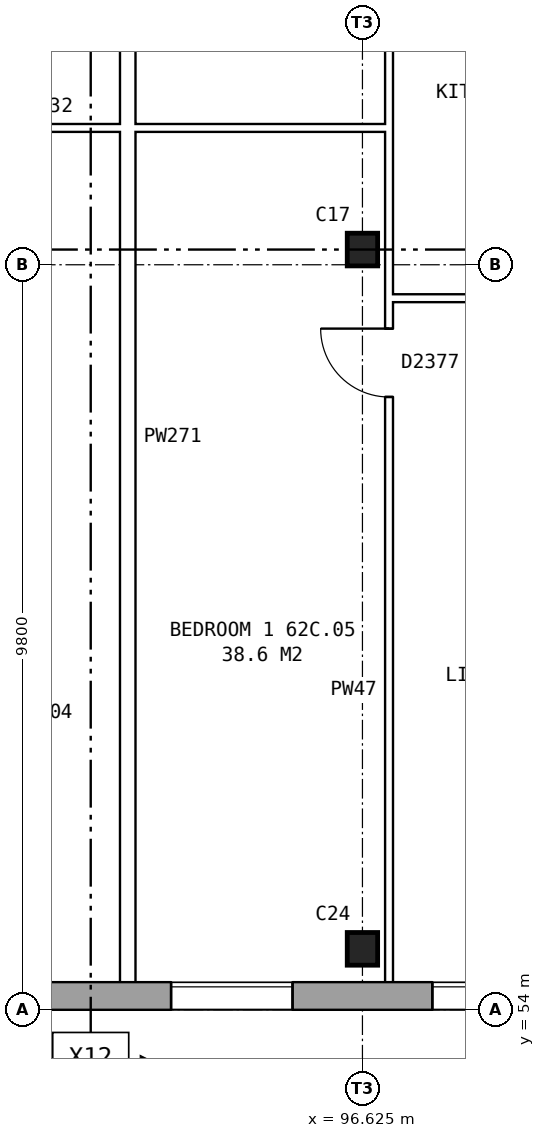
"""IFC4 building model, lengths in metres.
Left out: names, types, materials, properties, quantities, classifications, styles, units other than length and angle.
Written with IfcOpenShell. Run it as: python <this file> out.ifc"""

import sys

from ifc_helpers import new_model, si_unit, direction, frame, frame_2d, origin, origin_2d, place, context, subcontext, project, spatial, rectangle, i_section, extrude, element, fill, save


model = new_model("IFC4")
c1 = context("Model", 3, precision=1e-05, world=origin(), true_north=direction((0.0, 1.0)))
c2 = subcontext(c1, "Body", "Model", "MODEL_VIEW")
j1 = project(units=[si_unit("LENGTHUNIT", "METRE"), si_unit("PLANEANGLEUNIT", "RADIAN")], contexts=[c1])
p1 = place(None, origin())
s1 = spatial("IfcSite", under=j1, at=p1, CompositionType="ELEMENT")
p2 = place(p1, origin())
s2 = spatial("IfcBuilding", under=s1, at=p2, CompositionType="ELEMENT")
p3 = place(p2, frame((0.0, 0.0, 221.4)))
s3 = spatial("IfcBuildingStorey", under=s2, at=p3, CompositionType="ELEMENT", Elevation=221.4)
for number, where, z_axis, x_axis in (
    (1, (96.625, 54.8, 0.0), (0.0, 0.0, 1.0), (1.0, 0.0, 0.0)),
    (2, (96.625, 64.0, 0.0), (0.0, 0.0, 1.0), (1.0, 0.0, 0.0)),
):
    element("IfcColumn", number, at=place(p3, frame(where, z_axis=z_axis, x_axis=x_axis)), inside=s3, PredefinedType="COLUMN", context=c2, shape_type="SweptSolid", body=[
        extrude(i_section(OverallWidth=0.4, OverallDepth=0.43, WebThickness=0.04, FlangeThickness=0.04, at=origin_2d()), origin(), (0.0, 0.0, 1.0), 2.85),
    ])
p4 = place(p3, frame((75.95, 54.18, 0.0), z_axis=(0.0, 0.0, 1.0), x_axis=(1.0, 0.0, 0.0)))
e3 = element("IfcWall", 3, at=p4, inside=s3, PredefinedType="STANDARD", context=c2, shape_type="SweptSolid", body=[
    extrude(rectangle(XDim=55.1, YDim=0.36, at=frame_2d((27.55, 0.0))), origin(), (0.0, 0.0, 1.0), 2.85),
])
p5 = place(p4, frame((0.969, 0.0, 0.8)))
e4 = element("IfcOpeningElement", 4, at=p5, cuts=e3, PredefinedType="OPENING", context=c2, shape_type="SweptSolid", body=[
    extrude(rectangle(XDim=1.6, YDim=1.8, at=frame_2d((0.8, 0.9))), frame((0.0, 0.19, 0.0), z_axis=(0.0, -1.0, 0.0), x_axis=(1.0, 0.0, 0.0)), (0.0, 0.0, 1.0), 0.38),
])
p6 = place(p4, frame((4.406, 0.0, 0.8)))
e5 = element("IfcOpeningElement", 5, at=p6, cuts=e3, PredefinedType="OPENING", context=c2, shape_type="SweptSolid", body=[
    extrude(rectangle(XDim=1.6, YDim=1.8, at=frame_2d((0.8, 0.9))), frame((0.0, 0.19, 0.0), z_axis=(0.0, -1.0, 0.0), x_axis=(1.0, 0.0, 0.0)), (0.0, 0.0, 1.0), 0.38),
])
p7 = place(p4, frame((7.844, 0.0, 0.8)))
e6 = element("IfcOpeningElement", 6, at=p7, cuts=e3, PredefinedType="OPENING", context=c2, shape_type="SweptSolid", body=[
    extrude(rectangle(XDim=1.6, YDim=1.8, at=frame_2d((0.8, 0.9))), frame((0.0, 0.19, 0.0), z_axis=(0.0, -1.0, 0.0), x_axis=(1.0, 0.0, 0.0)), (0.0, 0.0, 1.0), 0.38),
])
p8 = place(p4, frame((11.281, 0.0, 0.8)))
e7 = element("IfcOpeningElement", 7, at=p8, cuts=e3, PredefinedType="OPENING", context=c2, shape_type="SweptSolid", body=[
    extrude(rectangle(XDim=1.6, YDim=1.8, at=frame_2d((0.8, 0.9))), frame((0.0, 0.19, 0.0), z_axis=(0.0, -1.0, 0.0), x_axis=(1.0, 0.0, 0.0)), (0.0, 0.0, 1.0), 0.38),
])
p9 = place(p4, frame((14.719, 0.0, 0.8)))
e8 = element("IfcOpeningElement", 8, at=p9, cuts=e3, PredefinedType="OPENING", context=c2, shape_type="SweptSolid", body=[
    extrude(rectangle(XDim=1.6, YDim=1.8, at=frame_2d((0.8, 0.9))), frame((0.0, 0.19, 0.0), z_axis=(0.0, -1.0, 0.0), x_axis=(1.0, 0.0, 0.0)), (0.0, 0.0, 1.0), 0.38),
])
p10 = place(p4, frame((18.156, 0.0, 0.8)))
e9 = element("IfcOpeningElement", 9, at=p10, cuts=e3, PredefinedType="OPENING", context=c2, shape_type="SweptSolid", body=[
    extrude(rectangle(XDim=1.6, YDim=1.8, at=frame_2d((0.8, 0.9))), frame((0.0, 0.19, 0.0), z_axis=(0.0, -1.0, 0.0), x_axis=(1.0, 0.0, 0.0)), (0.0, 0.0, 1.0), 0.38),
])
p11 = place(p4, frame((21.594, 0.0, 0.8)))
e10 = element("IfcOpeningElement", 10, at=p11, cuts=e3, PredefinedType="OPENING", context=c2, shape_type="SweptSolid", body=[
    extrude(rectangle(XDim=1.6, YDim=1.8, at=frame_2d((0.8, 0.9))), frame((0.0, 0.19, 0.0), z_axis=(0.0, -1.0, 0.0), x_axis=(1.0, 0.0, 0.0)), (0.0, 0.0, 1.0), 0.38),
])
p12 = place(p4, frame((25.031, 0.0, 0.8)))
e11 = element("IfcOpeningElement", 11, at=p12, cuts=e3, PredefinedType="OPENING", context=c2, shape_type="SweptSolid", body=[
    extrude(rectangle(XDim=1.6, YDim=1.8, at=frame_2d((0.8, 0.9))), frame((0.0, 0.19, 0.0), z_axis=(0.0, -1.0, 0.0), x_axis=(1.0, 0.0, 0.0)), (0.0, 0.0, 1.0), 0.38),
])
p13 = place(p4, frame((28.469, 0.0, 0.8)))
e12 = element("IfcOpeningElement", 12, at=p13, cuts=e3, PredefinedType="OPENING", context=c2, shape_type="SweptSolid", body=[
    extrude(rectangle(XDim=1.6, YDim=1.8, at=frame_2d((0.8, 0.9))), frame((0.0, 0.19, 0.0), z_axis=(0.0, -1.0, 0.0), x_axis=(1.0, 0.0, 0.0)), (0.0, 0.0, 1.0), 0.38),
])
p14 = place(p4, frame((31.906, 0.0, 0.8)))
e13 = element("IfcOpeningElement", 13, at=p14, cuts=e3, PredefinedType="OPENING", context=c2, shape_type="SweptSolid", body=[
    extrude(rectangle(XDim=1.6, YDim=1.8, at=frame_2d((0.8, 0.9))), frame((0.0, 0.19, 0.0), z_axis=(0.0, -1.0, 0.0), x_axis=(1.0, 0.0, 0.0)), (0.0, 0.0, 1.0), 0.38),
])
p15 = place(p4, frame((35.344, 0.0, 0.8)))
e14 = element("IfcOpeningElement", 14, at=p15, cuts=e3, PredefinedType="OPENING", context=c2, shape_type="SweptSolid", body=[
    extrude(rectangle(XDim=1.6, YDim=1.8, at=frame_2d((0.8, 0.9))), frame((0.0, 0.19, 0.0), z_axis=(0.0, -1.0, 0.0), x_axis=(1.0, 0.0, 0.0)), (0.0, 0.0, 1.0), 0.38),
])
p16 = place(p4, frame((38.781, 0.0, 0.8)))
e15 = element("IfcOpeningElement", 15, at=p16, cuts=e3, PredefinedType="OPENING", context=c2, shape_type="SweptSolid", body=[
    extrude(rectangle(XDim=1.6, YDim=1.8, at=frame_2d((0.8, 0.9))), frame((0.0, 0.19, 0.0), z_axis=(0.0, -1.0, 0.0), x_axis=(1.0, 0.0, 0.0)), (0.0, 0.0, 1.0), 0.38),
])
p17 = place(p4, frame((42.219, 0.0, 0.8)))
e16 = element("IfcOpeningElement", 16, at=p17, cuts=e3, PredefinedType="OPENING", context=c2, shape_type="SweptSolid", body=[
    extrude(rectangle(XDim=1.6, YDim=1.8, at=frame_2d((0.8, 0.9))), frame((0.0, 0.19, 0.0), z_axis=(0.0, -1.0, 0.0), x_axis=(1.0, 0.0, 0.0)), (0.0, 0.0, 1.0), 0.38),
])
p18 = place(p4, frame((45.656, 0.0, 0.8)))
e17 = element("IfcOpeningElement", 17, at=p18, cuts=e3, PredefinedType="OPENING", context=c2, shape_type="SweptSolid", body=[
    extrude(rectangle(XDim=1.6, YDim=1.8, at=frame_2d((0.8, 0.9))), frame((0.0, 0.19, 0.0), z_axis=(0.0, -1.0, 0.0), x_axis=(1.0, 0.0, 0.0)), (0.0, 0.0, 1.0), 0.38),
])
p19 = place(p4, frame((49.094, 0.0, 0.8)))
e18 = element("IfcOpeningElement", 18, at=p19, cuts=e3, PredefinedType="OPENING", context=c2, shape_type="SweptSolid", body=[
    extrude(rectangle(XDim=1.6, YDim=1.8, at=frame_2d((0.8, 0.9))), frame((0.0, 0.19, 0.0), z_axis=(0.0, -1.0, 0.0), x_axis=(1.0, 0.0, 0.0)), (0.0, 0.0, 1.0), 0.38),
])
p20 = place(p4, frame((52.531, 0.0, 0.8)))
e19 = element("IfcOpeningElement", 19, at=p20, cuts=e3, PredefinedType="OPENING", context=c2, shape_type="SweptSolid", body=[
    extrude(rectangle(XDim=1.6, YDim=1.8, at=frame_2d((0.8, 0.9))), frame((0.0, 0.19, 0.0), z_axis=(0.0, -1.0, 0.0), x_axis=(1.0, 0.0, 0.0)), (0.0, 0.0, 1.0), 0.38),
])
p21 = place(p3, frame((96.975, 63.36, 0.0), z_axis=(0.0, 0.0, 1.0), x_axis=(1.0, 0.0, 0.0)))
e20 = element("IfcWall", 20, at=p21, inside=s3, PredefinedType="PARTITIONING", context=c2, shape_type="SweptSolid", body=[
    extrude(rectangle(XDim=3.437, YDim=0.1, at=frame_2d((1.719, 0.0))), origin(), (0.0, 0.0, 1.0), 2.85),
])
p22 = place(p21, frame((1.269, 0.0, 0.0)))
e21 = element("IfcOpeningElement", 21, at=p22, cuts=e20, PredefinedType="OPENING", context=c2, shape_type="SweptSolid", body=[
    extrude(rectangle(XDim=0.9, YDim=2.1, at=frame_2d((0.45, 1.05))), frame((0.0, 0.06, 0.0), z_axis=(0.0, -1.0, 0.0), x_axis=(1.0, 0.0, 0.0)), (0.0, 0.0, 1.0), 0.12),
])
p23 = place(p3, frame((90.1, 65.6, 0.0), z_axis=(0.0, 0.0, 1.0), x_axis=(1.0, 0.0, 0.0)))
e22 = element("IfcWall", 22, at=p23, inside=s3, PredefinedType="PARTITIONING", context=c2, shape_type="SweptSolid", body=[
    extrude(rectangle(XDim=6.875, YDim=0.1, at=frame_2d((3.438, 0.0))), origin(), (0.0, 0.0, 1.0), 2.85),
])
p24 = place(p3, frame((93.537, 54.36, 0.0), z_axis=(0.0, 0.0, 1.0), x_axis=(0.0, 1.0, 0.0)))
e23 = element("IfcWall", 23, at=p24, inside=s3, PredefinedType="PARTITIONING", context=c2, shape_type="SweptSolid", body=[
    extrude(rectangle(XDim=14.34, YDim=0.2, at=frame_2d((7.17, 0.0))), origin(), (0.0, 0.0, 1.0), 2.85),
])
p25 = place(p3, frame((96.975, 54.36, 0.0), z_axis=(0.0, 0.0, 1.0), x_axis=(0.0, 1.0, 0.0)))
e24 = element("IfcWall", 24, at=p25, inside=s3, PredefinedType="PARTITIONING", context=c2, shape_type="SweptSolid", body=[
    extrude(rectangle(XDim=14.34, YDim=0.1, at=frame_2d((7.17, 0.0))), origin(), (0.0, 0.0, 1.0), 2.85),
])
p26 = place(p25, frame((7.7, 0.0, 0.0)))
e25 = element("IfcOpeningElement", 25, at=p26, cuts=e24, PredefinedType="OPENING", context=c2, shape_type="SweptSolid", body=[
    extrude(rectangle(XDim=0.9, YDim=2.1, at=frame_2d((0.45, 1.05))), frame((0.0, 0.06, 0.0), z_axis=(0.0, -1.0, 0.0), x_axis=(1.0, 0.0, 0.0)), (0.0, 0.0, 1.0), 0.12),
])
p27 = place(p25, frame((13.04, 0.0, 0.0)))
e26 = element("IfcOpeningElement", 26, at=p27, cuts=e24, PredefinedType="OPENING", context=c2, shape_type="SweptSolid", body=[
    extrude(rectangle(XDim=0.9, YDim=2.1, at=frame_2d((0.45, 1.05))), frame((0.0, 0.06, 0.0), z_axis=(0.0, -1.0, 0.0), x_axis=(1.0, 0.0, 0.0)), (0.0, 0.0, 1.0), 0.12),
])
p28 = place(p10, origin())
e27 = element("IfcWindow", 27, at=p28, inside=s3, PartitioningType="SINGLE_PANEL", PredefinedType="WINDOW", context=c2, shape_type="SweptSolid", body=[
    extrude(rectangle(XDim=1.6, YDim=1.8, at=frame_2d((0.8, 0.9))), frame((0.0, 0.15, 0.0), z_axis=(0.0, -1.0, 0.0), x_axis=(1.0, 0.0, 0.0)), (0.0, 0.0, 1.0), 0.06),
])
fill(e9, e27)
p29 = place(p11, origin())
e28 = element("IfcWindow", 28, at=p29, inside=s3, PartitioningType="SINGLE_PANEL", PredefinedType="WINDOW", context=c2, shape_type="SweptSolid", body=[
    extrude(rectangle(XDim=1.6, YDim=1.8, at=frame_2d((0.8, 0.9))), frame((0.0, 0.15, 0.0), z_axis=(0.0, -1.0, 0.0), x_axis=(1.0, 0.0, 0.0)), (0.0, 0.0, 1.0), 0.06),
])
fill(e10, e28)
p30 = place(p26, origin())
e29 = element("IfcDoor", 29, at=p30, inside=s3, OperationType="SINGLE_SWING_RIGHT", PredefinedType="DOOR", context=c2, shape_type="SweptSolid", body=[
    extrude(rectangle(XDim=0.9, YDim=2.1, at=frame_2d((0.45, 1.05))), frame((0.0, 0.025, 0.0), z_axis=(0.0, -1.0, 0.0), x_axis=(1.0, 0.0, 0.0)), (0.0, 0.0, 1.0), 0.05),
])
fill(e25, e29)
save(model, sys.argv[1])
